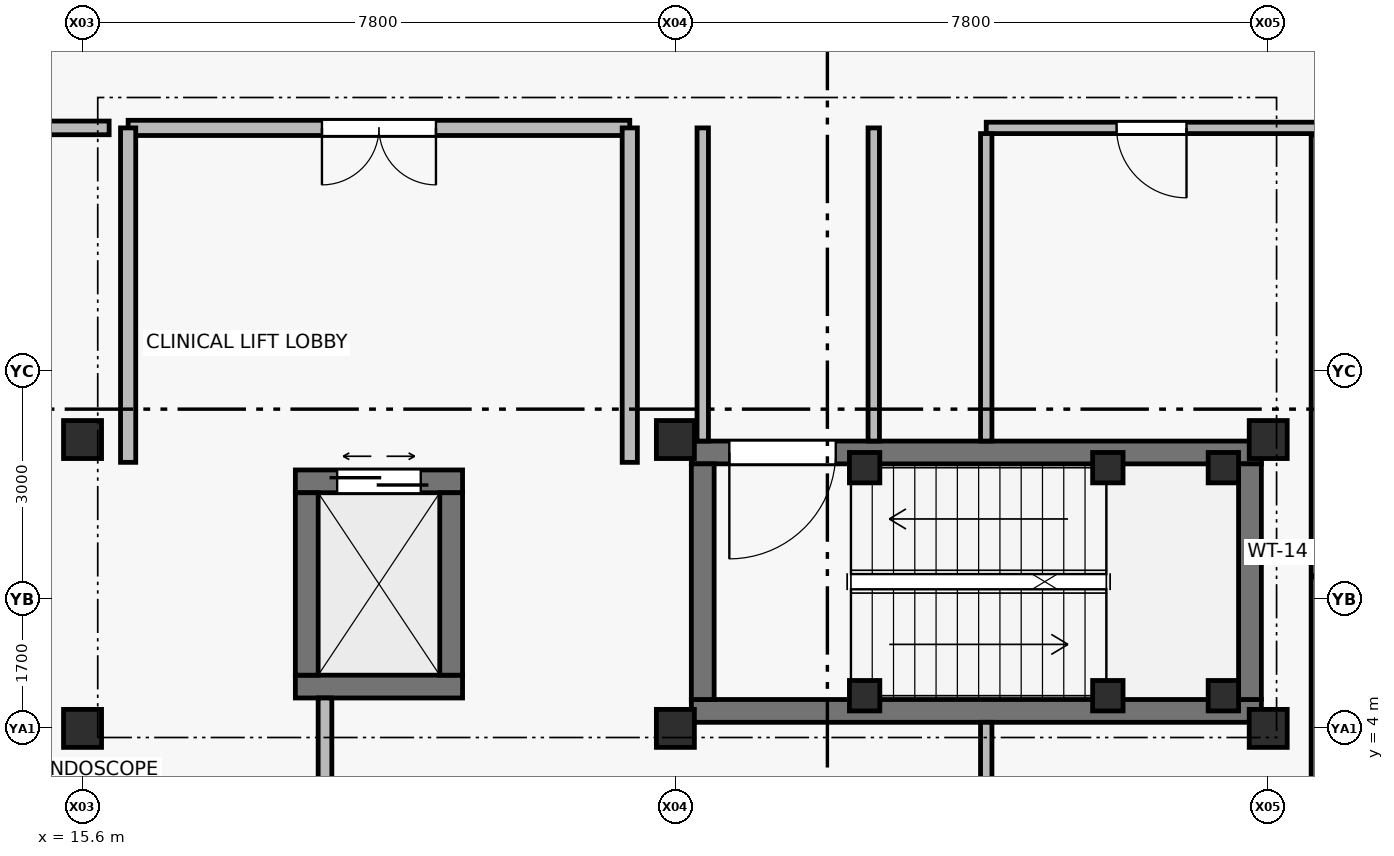
"""IFC4 building model, lengths in metres.
Left out: names, types, materials, properties, quantities, classifications, styles, units other than length and angle.
Written with IfcOpenShell. Run it as: python <this file> out.ifc"""

import sys

from ifc_helpers import new_model, si_unit, direction, frame, frame_2d, origin, origin_2d, place, context, subcontext, project, spatial, rectangle, extrude, element, fill, save


model = new_model("IFC4")
c1 = context("Model", 3, precision=1e-05, world=origin(), true_north=direction((0.0, 1.0)))
c2 = subcontext(c1, "Body", "Model", "MODEL_VIEW")
j1 = project(units=[si_unit("LENGTHUNIT", "METRE"), si_unit("PLANEANGLEUNIT", "RADIAN")], contexts=[c1])
p1 = place(None, origin())
s1 = spatial("IfcSite", under=j1, at=p1, CompositionType="ELEMENT")
p2 = place(p1, origin())
s2 = spatial("IfcBuilding", under=s1, at=p2, CompositionType="ELEMENT")
p3 = place(p2, frame((0.0, 0.0, 14.1)))
s3 = spatial("IfcBuildingStorey", under=s2, at=p3, CompositionType="ELEMENT", Elevation=14.1)
for number, where, z_axis, x_axis in (
    (1, (15.6, 4.0, 0.0), (0.0, 0.0, 1.0), (1.0, 0.0, 0.0)),
    (2, (15.6, 7.8, 0.0), (0.0, 0.0, 1.0), (1.0, 0.0, 0.0)),
    (3, (23.4, 4.0, 0.0), (0.0, 0.0, 1.0), (1.0, 0.0, 0.0)),
    (4, (23.4, 7.8, 0.0), (0.0, 0.0, 1.0), (1.0, 0.0, 0.0)),
    (5, (31.2, 4.0, 0.0), (0.0, 0.0, 1.0), (1.0, 0.0, 0.0)),
    (6, (31.2, 7.8, 0.0), (0.0, 0.0, 1.0), (1.0, 0.0, 0.0)),
):
    element("IfcColumn", number, at=place(p3, frame(where, z_axis=z_axis, x_axis=x_axis)), inside=s3, PredefinedType="COLUMN", context=c2, shape_type="SweptSolid", body=[
        extrude(rectangle(XDim=0.5, YDim=0.5, at=origin_2d()), origin(), (0.0, 0.0, 1.0), 4.5),
    ])
for number, where, z_axis, x_axis in (
    (7, (25.89, 4.43, 0.0), (0.0, 0.0, 1.0), (1.0, 0.0, 0.0)),
    (8, (25.89, 7.43, 0.0), (0.0, 0.0, 1.0), (1.0, 0.0, 0.0)),
    (9, (29.09, 4.43, 0.0), (0.0, 0.0, 1.0), (1.0, 0.0, 0.0)),
    (10, (29.09, 7.43, 0.0), (0.0, 0.0, 1.0), (1.0, 0.0, 0.0)),
    (11, (30.61, 4.43, 0.0), (0.0, 0.0, 1.0), (1.0, 0.0, 0.0)),
    (12, (30.61, 7.43, 0.0), (0.0, 0.0, 1.0), (1.0, 0.0, 0.0)),
):
    element("IfcColumn", number, at=place(p3, frame(where, z_axis=z_axis, x_axis=x_axis)), inside=s3, PredefinedType="COLUMN", context=c2, shape_type="SweptSolid", body=[
        extrude(rectangle(XDim=0.4, YDim=0.4, at=origin_2d()), origin(), (0.0, 0.0, 1.0), 4.5),
    ])
p4 = place(p3, frame((23.61, 4.23, 0.0), z_axis=(0.0, 0.0, 1.0), x_axis=(1.0, 0.0, 0.0)))
e13 = element("IfcWall", 13, at=p4, inside=s3, PredefinedType="SHEAR", context=c2, shape_type="SweptSolid", body=[
    extrude(rectangle(XDim=7.5, YDim=0.3, at=frame_2d((3.75, 0.0))), origin(), (0.0, 0.0, 1.0), 4.26),
])
p5 = place(p3, frame((31.11, 7.63, 0.0), z_axis=(0.0, 0.0, 1.0), x_axis=(-1.0, 0.0, 0.0)))
e14 = element("IfcWall", 14, at=p5, inside=s3, PredefinedType="SHEAR", context=c2, shape_type="SweptSolid", body=[
    extrude(rectangle(XDim=7.5, YDim=0.3, at=frame_2d((3.75, 0.0))), origin(), (0.0, 0.0, 1.0), 4.26),
])
p6 = place(p5, frame((5.6, 0.0, 0.0)))
e15 = element("IfcOpeningElement", 15, at=p6, cuts=e14, PredefinedType="OPENING", context=c2, shape_type="SweptSolid", body=[
    extrude(rectangle(XDim=1.4, YDim=2.2, at=frame_2d((0.7, 1.1))), frame((0.0, 0.16, 0.0), z_axis=(0.0, -1.0, 0.0), x_axis=(1.0, 0.0, 0.0)), (0.0, 0.0, 1.0), 0.32),
])
for number, where, z_axis, x_axis in (
    (16, (23.76, 7.48, 0.0), (0.0, 0.0, 1.0), (0.0, -1.0, 0.0)),
    (17, (30.96, 4.38, 0.0), (0.0, 0.0, 1.0), (0.0, 1.0, 0.0)),
):
    element("IfcWall", number, at=place(p3, frame(where, z_axis=z_axis, x_axis=x_axis)), inside=s3, PredefinedType="SHEAR", context=c2, shape_type="SweptSolid", body=[
        extrude(rectangle(XDim=3.1, YDim=0.3, at=frame_2d((1.55, 0.0))), origin(), (0.0, 0.0, 1.0), 4.26),
    ])
p7 = place(p3, frame((18.4, 4.55, 0.0), z_axis=(0.0, 0.0, 1.0), x_axis=(1.0, 0.0, 0.0)))
e18 = element("IfcWall", 18, at=p7, inside=s3, PredefinedType="SHEAR", context=c2, shape_type="SweptSolid", body=[
    extrude(rectangle(XDim=2.2, YDim=0.3, at=frame_2d((1.1, 0.0))), origin(), (0.0, 0.0, 1.0), 4.26),
])
p8 = place(p3, frame((20.6, 7.25, 0.0), z_axis=(0.0, 0.0, 1.0), x_axis=(-1.0, 0.0, 0.0)))
e19 = element("IfcWall", 19, at=p8, inside=s3, PredefinedType="SHEAR", context=c2, shape_type="SweptSolid", body=[
    extrude(rectangle(XDim=2.2, YDim=0.3, at=frame_2d((1.1, 0.0))), origin(), (0.0, 0.0, 1.0), 4.26),
])
p9 = place(p8, frame((0.55, 0.0, 0.0)))
e20 = element("IfcOpeningElement", 20, at=p9, cuts=e19, PredefinedType="OPENING", context=c2, shape_type="SweptSolid", body=[
    extrude(rectangle(XDim=1.1, YDim=2.2, at=frame_2d((0.55, 1.1))), frame((0.0, 0.16, 0.0), z_axis=(0.0, -1.0, 0.0), x_axis=(1.0, 0.0, 0.0)), (0.0, 0.0, 1.0), 0.32),
])
for number, where, z_axis, x_axis in (
    (21, (18.55, 7.1, 0.0), (0.0, 0.0, 1.0), (0.0, -1.0, 0.0)),
    (22, (20.45, 4.7, 0.0), (0.0, 0.0, 1.0), (0.0, 1.0, 0.0)),
):
    element("IfcWall", number, at=place(p3, frame(where, z_axis=z_axis, x_axis=x_axis)), inside=s3, PredefinedType="SHEAR", context=c2, shape_type="SweptSolid", body=[
        extrude(rectangle(XDim=2.4, YDim=0.3, at=frame_2d((1.2, 0.0))), origin(), (0.0, 0.0, 1.0), 4.26),
    ])
p10 = place(p3, frame((22.8, 11.9, 0.0), z_axis=(0.0, 0.0, 1.0), x_axis=(-1.0, 0.0, 0.0)))
e23 = element("IfcWall", 23, at=p10, inside=s3, PredefinedType="SOLIDWALL", context=c2, shape_type="SweptSolid", body=[
    extrude(rectangle(XDim=6.6, YDim=0.2, at=frame_2d((3.3, 0.0))), origin(), (0.0, 0.0, 1.0), 4.26),
])
p11 = place(p10, frame((2.55, 0.0, 0.0)))
e24 = element("IfcOpeningElement", 24, at=p11, cuts=e23, PredefinedType="OPENING", context=c2, shape_type="SweptSolid", body=[
    extrude(rectangle(XDim=1.5, YDim=2.2, at=frame_2d((0.75, 1.1))), frame((0.0, 0.11, 0.0), z_axis=(0.0, -1.0, 0.0), x_axis=(1.0, 0.0, 0.0)), (0.0, 0.0, 1.0), 0.22),
])
for number, where, z_axis, x_axis in (
    (25, (16.2, 11.9, 0.0), (0.0, 0.0, 1.0), (0.0, -1.0, 0.0)),
    (26, (22.8, 7.5, 0.0), (0.0, 0.0, 1.0), (0.0, 1.0, 0.0)),
):
    element("IfcWall", number, at=place(p3, frame(where, z_axis=z_axis, x_axis=x_axis)), inside=s3, PredefinedType="SOLIDWALL", context=c2, shape_type="SweptSolid", body=[
        extrude(rectangle(XDim=4.4, YDim=0.2, at=frame_2d((2.2, 0.0))), origin(), (0.0, 0.0, 1.0), 4.26),
    ])
p12 = place(p3, frame((23.76, 7.78, 0.0), z_axis=(0.0, 0.0, 1.0), x_axis=(0.0, 1.0, 0.0)))
e27 = element("IfcWall", 27, at=p12, inside=s3, PredefinedType="PARTITIONING", context=c2, shape_type="SweptSolid", body=[
    extrude(rectangle(XDim=4.12, YDim=0.15, at=frame_2d((2.06, 0.0))), origin(), (0.0, 0.0, 1.0), 3.77),
])
p13 = place(p3, frame((26.01, 7.78, 0.0), z_axis=(0.0, 0.0, 1.0), x_axis=(0.0, 1.0, 0.0)))
e28 = element("IfcWall", 28, at=p13, inside=s3, PredefinedType="PARTITIONING", context=c2, shape_type="SweptSolid", body=[
    extrude(rectangle(XDim=4.12, YDim=0.15, at=frame_2d((2.06, 0.0))), origin(), (0.0, 0.0, 1.0), 4.26),
])
p14 = place(p3, frame((15.95, 11.9, 0.0), z_axis=(0.0, 0.0, 1.0), x_axis=(-1.0, 0.0, 0.0)))
e29 = element("IfcWall", 29, at=p14, inside=s3, PredefinedType="PARTITIONING", context=c2, shape_type="SweptSolid", body=[
    extrude(rectangle(XDim=3.01, YDim=0.18, at=frame_2d((1.505, 0.0))), origin(), (0.0, 0.0, 1.0), 4.26),
])
p15 = place(p14, frame((0.86, 0.0, 0.0)))
e30 = element("IfcOpeningElement", 30, at=p15, cuts=e29, PredefinedType="OPENING", context=c2, shape_type="SweptSolid", body=[
    extrude(rectangle(XDim=1.3, YDim=2.2, at=frame_2d((0.65, 1.1))), frame((0.0, 0.1, 0.0), z_axis=(0.0, -1.0, 0.0), x_axis=(1.0, 0.0, 0.0)), (0.0, 0.0, 1.0), 0.2),
])
p16 = place(p3, frame((31.84, 11.9, 0.0), z_axis=(0.0, 0.0, 1.0), x_axis=(-1.0, 0.0, 0.0)))
e31 = element("IfcWall", 31, at=p16, inside=s3, PredefinedType="PARTITIONING", context=c2, shape_type="SweptSolid", body=[
    extrude(rectangle(XDim=4.35, YDim=0.15, at=frame_2d((2.175, 0.0))), origin(), (0.0, 0.0, 1.0), 4.26),
])
p17 = place(p16, frame((1.715, 0.0, 0.0)))
e32 = element("IfcOpeningElement", 32, at=p17, cuts=e31, PredefinedType="OPENING", context=c2, shape_type="SweptSolid", body=[
    extrude(rectangle(XDim=0.92, YDim=2.15, at=frame_2d((0.46, 1.075))), frame((0.0, 0.085, 0.0), z_axis=(0.0, -1.0, 0.0), x_axis=(1.0, 0.0, 0.0)), (0.0, 0.0, 1.0), 0.17),
])
p18 = place(p3, frame((18.79, 0.19, 0.0), z_axis=(0.0, 0.0, 1.0), x_axis=(0.0, 1.0, 0.0)))
e33 = element("IfcWall", 33, at=p18, inside=s3, PredefinedType="PARTITIONING", context=c2, shape_type="SweptSolid", body=[
    extrude(rectangle(XDim=4.21, YDim=0.18, at=frame_2d((2.105, 0.0))), origin(), (0.0, 0.0, 1.0), 4.26),
])
p19 = place(p3, frame((27.49, 0.19, 0.0), z_axis=(0.0, 0.0, 1.0), x_axis=(0.0, 1.0, 0.0)))
e34 = element("IfcWall", 34, at=p19, inside=s3, PredefinedType="PARTITIONING", context=c2, shape_type="SweptSolid", body=[
    extrude(rectangle(XDim=3.89, YDim=0.15, at=frame_2d((1.945, 0.0))), origin(), (0.0, 0.0, 1.0), 4.26),
])
p20 = place(p3, frame((27.49, 7.78, 0.0), z_axis=(0.0, 0.0, 1.0), x_axis=(0.0, 1.0, 0.0)))
e35 = element("IfcWall", 35, at=p20, inside=s3, PredefinedType="PARTITIONING", context=c2, shape_type="SweptSolid", body=[
    extrude(rectangle(XDim=4.045, YDim=0.15, at=frame_2d((2.022, 0.0))), origin(), (0.0, 0.0, 1.0), 4.26),
])
p21 = place(p3, frame((31.84, 0.19, 0.0), z_axis=(0.0, 0.0, 1.0), x_axis=(0.0, 1.0, 0.0)))
e36 = element("IfcWall", 36, at=p21, inside=s3, PredefinedType="PARTITIONING", context=c2, shape_type="SweptSolid", body=[
    extrude(rectangle(XDim=11.62, YDim=0.15, at=frame_2d((5.81, 0.0))), origin(), (0.0, 0.0, 1.0), 4.26),
])
p22 = place(p6, origin())
e37 = element("IfcDoor", 37, at=p22, inside=s3, OperationType="SINGLE_SWING_RIGHT", PredefinedType="DOOR", context=c2, shape_type="SweptSolid", body=[
    extrude(rectangle(XDim=1.4, YDim=2.2, at=frame_2d((0.7, 1.1))), frame((0.0, 0.025, 0.0), z_axis=(0.0, -1.0, 0.0), x_axis=(1.0, 0.0, 0.0)), (0.0, 0.0, 1.0), 0.05),
])
fill(e15, e37)
p23 = place(p9, origin())
e38 = element("IfcDoor", 38, at=p23, inside=s3, OperationType="DOUBLE_DOOR_SLIDING", PredefinedType="DOOR", context=c2, shape_type="SweptSolid", body=[
    extrude(rectangle(XDim=1.1, YDim=2.2, at=frame_2d((0.55, 1.1))), frame((0.0, 0.025, 0.0), z_axis=(0.0, -1.0, 0.0), x_axis=(1.0, 0.0, 0.0)), (0.0, 0.0, 1.0), 0.05),
])
fill(e20, e38)
p24 = place(p11, origin())
e39 = element("IfcDoor", 39, at=p24, inside=s3, OperationType="DOUBLE_DOOR_SINGLE_SWING", PredefinedType="DOOR", context=c2, shape_type="SweptSolid", body=[
    extrude(rectangle(XDim=1.5, YDim=2.2, at=frame_2d((0.75, 1.1))), frame((0.0, 0.025, 0.0), z_axis=(0.0, -1.0, 0.0), x_axis=(1.0, 0.0, 0.0)), (0.0, 0.0, 1.0), 0.05),
])
fill(e24, e39)
p25 = place(p17, origin())
e40 = element("IfcDoor", 40, at=p25, inside=s3, OperationType="SINGLE_SWING_LEFT", PredefinedType="DOOR", context=c2, shape_type="SweptSolid", body=[
    extrude(rectangle(XDim=0.92, YDim=2.15, at=frame_2d((0.46, 1.075))), frame((0.0, 0.025, 0.0), z_axis=(0.0, -1.0, 0.0), x_axis=(1.0, 0.0, 0.0)), (0.0, 0.0, 1.0), 0.05),
])
fill(e32, e40)
save(model, sys.argv[1])
